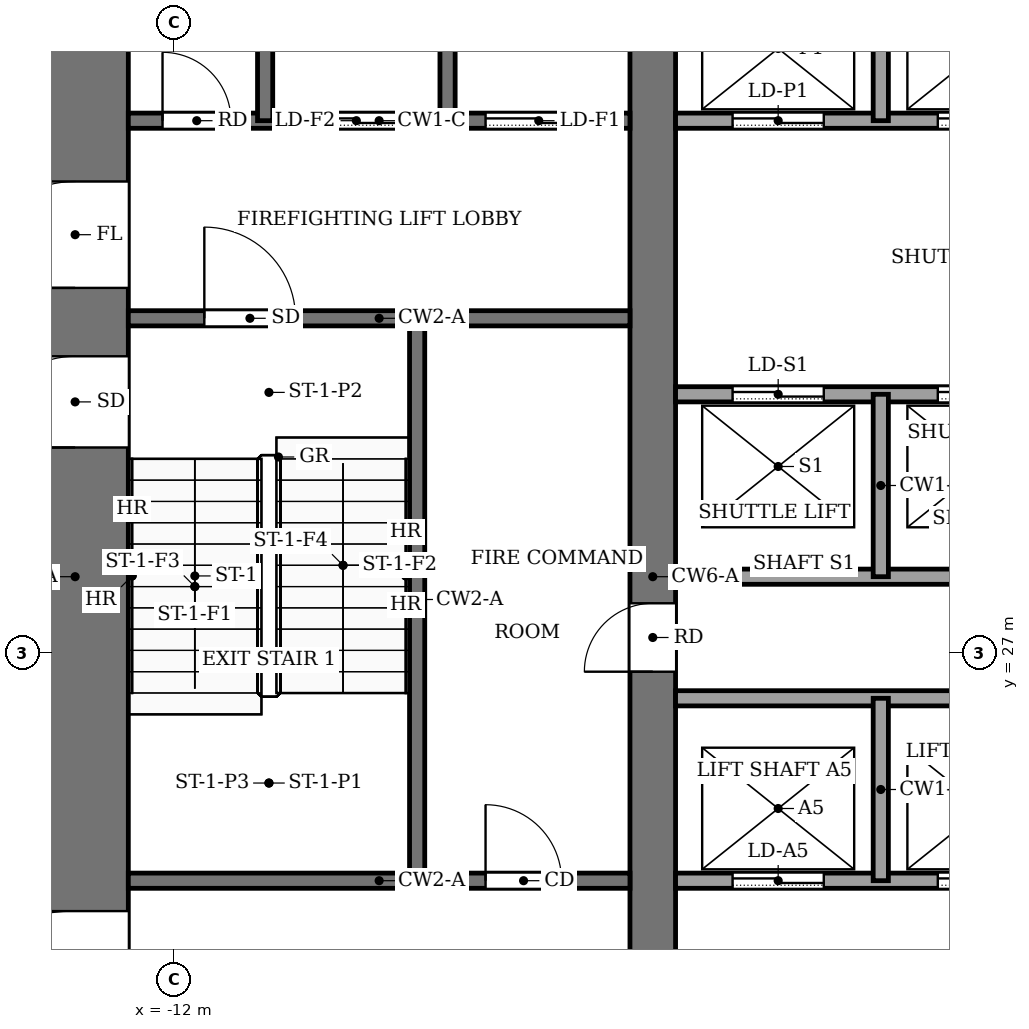
"""IFC4 building model, lengths in metres.
Left out: names, types, materials, properties, quantities, classifications, styles, units other than length and angle.
Written with IfcOpenShell. Run it as: python <this file> out.ifc"""

import sys

from ifc_helpers import new_model, si_unit, direction, frame, frame_2d, origin, place, context, subcontext, project, spatial, rectangle, extrude, element, fill, save


model = new_model("IFC4")
c1 = context("Model", 3, precision=1e-05, world=origin(), true_north=direction((0.0, 1.0)))
c2 = subcontext(c1, "Body", "Model", "MODEL_VIEW")
j1 = project(units=[si_unit("LENGTHUNIT", "METRE"), si_unit("PLANEANGLEUNIT", "RADIAN")], contexts=[c1])
p1 = place(None, origin())
s1 = spatial("IfcSite", under=j1, at=p1, CompositionType="ELEMENT")
p2 = place(p1, origin())
s2 = spatial("IfcBuilding", under=s1, at=p2, CompositionType="ELEMENT")
p3 = place(p2, origin())
s3 = spatial("IfcBuildingStorey", under=s2, at=p3, CompositionType="ELEMENT", Elevation=0.0)
p4 = place(p3, frame((-13.3, 18.4, -0.45), z_axis=(0.0, 0.0, 1.0), x_axis=(0.0, 1.0, 0.0)))
e1 = element("IfcWall", 1, at=p4, inside=s3, PredefinedType="SHEAR", context=c2, shape_type="SweptSolid", body=[
    extrude(rectangle(XDim=19.2, YDim=1.4, at=frame_2d((9.6, 0.0))), origin(), (0.0, 0.0, 1.0), 9.32),
])
p5 = place(p4, frame((2.8, 0.0, 0.45)))
e2 = element("IfcOpeningElement", 2, at=p5, cuts=e1, PredefinedType="OPENING", context=c2, shape_type="SweptSolid", body=[
    extrude(rectangle(XDim=2.4, YDim=2.4, at=frame_2d((1.2, 1.2))), frame((0.0, 0.71, 0.0), z_axis=(0.0, -1.0, 0.0), x_axis=(1.0, 0.0, 0.0)), (0.0, 0.0, 1.0), 1.42),
])
p6 = place(p4, frame((13.4, 0.0, 0.45)))
e3 = element("IfcOpeningElement", 3, at=p6, cuts=e1, PredefinedType="OPENING", context=c2, shape_type="SweptSolid", body=[
    extrude(rectangle(XDim=1.4, YDim=2.2, at=frame_2d((0.7, 1.1))), frame((0.0, 0.71, 0.0), z_axis=(0.0, -1.0, 0.0), x_axis=(1.0, 0.0, 0.0)), (0.0, 0.0, 1.0), 1.42),
])
p7 = place(p4, frame((11.3, 0.0, 0.45)))
e4 = element("IfcOpeningElement", 4, at=p7, cuts=e1, PredefinedType="OPENING", context=c2, shape_type="SweptSolid", body=[
    extrude(rectangle(XDim=1.2, YDim=2.2, at=frame_2d((0.6, 1.1))), frame((0.0, 0.71, 0.0), z_axis=(0.0, -1.0, 0.0), x_axis=(1.0, 0.0, 0.0)), (0.0, 0.0, 1.0), 1.42),
])
p8 = place(p3, frame((-5.7, 18.4, -0.45), z_axis=(0.0, 0.0, 1.0), x_axis=(0.0, 1.0, 0.0)))
e5 = element("IfcWall", 5, at=p8, inside=s3, PredefinedType="SHEAR", context=c2, shape_type="SweptSolid", body=[
    extrude(rectangle(XDim=19.2, YDim=0.6, at=frame_2d((9.6, 0.0))), origin(), (0.0, 0.0, 1.0), 9.32),
])
p9 = place(p8, frame((8.35, 0.0, 0.45)))
e6 = element("IfcOpeningElement", 6, at=p9, cuts=e5, PredefinedType="OPENING", context=c2, shape_type="SweptSolid", body=[
    extrude(rectangle(XDim=0.9, YDim=2.1, at=frame_2d((0.45, 1.05))), frame((0.0, 0.31, 0.0), z_axis=(0.0, -1.0, 0.0), x_axis=(1.0, 0.0, 0.0)), (0.0, 0.0, 1.0), 0.62),
])
p10 = place(p3, frame((-12.6, 24.0, 0.0), z_axis=(0.0, 0.0, 1.0), x_axis=(1.0, 0.0, 0.0)))
e7 = element("IfcWall", 7, at=p10, inside=s3, PredefinedType="PARTITIONING", context=c2, shape_type="SweptSolid", body=[
    extrude(rectangle(XDim=6.6, YDim=0.2, at=frame_2d((3.3, 0.0))), origin(), (0.0, 0.0, 1.0), 8.87),
])
p11 = place(p10, frame((4.7, 0.0, 0.0)))
e8 = element("IfcOpeningElement", 8, at=p11, cuts=e7, PredefinedType="OPENING", context=c2, shape_type="SweptSolid", body=[
    extrude(rectangle(XDim=1.0, YDim=2.1, at=frame_2d((0.5, 1.05))), frame((0.0, 0.11, 0.0), z_axis=(0.0, -1.0, 0.0), x_axis=(1.0, 0.0, 0.0)), (0.0, 0.0, 1.0), 0.22),
])
p12 = place(p3, frame((-5.4, 24.0, 0.0), z_axis=(0.0, 0.0, 1.0), x_axis=(1.0, 0.0, 0.0)))
e9 = element("IfcWall", 9, at=p12, inside=s3, PredefinedType="PARTITIONING", context=c2, shape_type="SweptSolid", body=[
    extrude(rectangle(XDim=10.8, YDim=0.2, at=frame_2d((5.4, 0.0))), origin(), (0.0, 0.0, 1.0), 8.87),
])
p13 = place(p12, frame((0.75, 0.0, 0.0)))
e10 = element("IfcOpeningElement", 10, at=p13, cuts=e9, PredefinedType="OPENING", context=c2, shape_type="SweptSolid", body=[
    extrude(rectangle(XDim=1.2, YDim=2.2, at=frame_2d((0.6, 1.1))), frame((0.0, 0.11, 0.0), z_axis=(0.0, -1.0, 0.0), x_axis=(1.0, 0.0, 0.0)), (0.0, 0.0, 1.0), 0.22),
])
p14 = place(p12, frame((3.45, 0.0, 0.0)))
e11 = element("IfcOpeningElement", 11, at=p14, cuts=e9, PredefinedType="OPENING", context=c2, shape_type="SweptSolid", body=[
    extrude(rectangle(XDim=1.2, YDim=2.2, at=frame_2d((0.6, 1.1))), frame((0.0, 0.11, 0.0), z_axis=(0.0, -1.0, 0.0), x_axis=(1.0, 0.0, 0.0)), (0.0, 0.0, 1.0), 0.22),
])
p15 = place(p12, frame((6.15, 0.0, 0.0)))
e12 = element("IfcOpeningElement", 12, at=p15, cuts=e9, PredefinedType="OPENING", context=c2, shape_type="SweptSolid", body=[
    extrude(rectangle(XDim=1.2, YDim=2.2, at=frame_2d((0.6, 1.1))), frame((0.0, 0.11, 0.0), z_axis=(0.0, -1.0, 0.0), x_axis=(1.0, 0.0, 0.0)), (0.0, 0.0, 1.0), 0.22),
])
p16 = place(p12, frame((8.85, 0.0, 0.0)))
e13 = element("IfcOpeningElement", 13, at=p16, cuts=e9, PredefinedType="OPENING", context=c2, shape_type="SweptSolid", body=[
    extrude(rectangle(XDim=1.2, YDim=2.2, at=frame_2d((0.6, 1.1))), frame((0.0, 0.11, 0.0), z_axis=(0.0, -1.0, 0.0), x_axis=(1.0, 0.0, 0.0)), (0.0, 0.0, 1.0), 0.22),
])
for number, where, z_axis, x_axis in (
    (14, (-5.4, 26.4, 0.0), (0.0, 0.0, 1.0), (1.0, 0.0, 0.0)),
    (15, (-5.4, 28.0, 0.0), (0.0, 0.0, 1.0), (1.0, 0.0, 0.0)),
):
    element("IfcWall", number, at=place(p3, frame(where, z_axis=z_axis, x_axis=x_axis)), inside=s3, PredefinedType="PARTITIONING", context=c2, shape_type="SweptSolid", body=[
        extrude(rectangle(XDim=10.8, YDim=0.2, at=frame_2d((5.4, 0.0))), origin(), (0.0, 0.0, 1.0), 8.87),
    ])
p17 = place(p3, frame((-5.4, 30.4, 0.0), z_axis=(0.0, 0.0, 1.0), x_axis=(1.0, 0.0, 0.0)))
e16 = element("IfcWall", 16, at=p17, inside=s3, PredefinedType="PARTITIONING", context=c2, shape_type="SweptSolid", body=[
    extrude(rectangle(XDim=10.8, YDim=0.2, at=frame_2d((5.4, 0.0))), origin(), (0.0, 0.0, 1.0), 8.87),
])
p18 = place(p17, frame((0.75, 0.0, 0.0)))
e17 = element("IfcOpeningElement", 17, at=p18, cuts=e16, PredefinedType="OPENING", context=c2, shape_type="SweptSolid", body=[
    extrude(rectangle(XDim=1.2, YDim=2.2, at=frame_2d((0.6, 1.1))), frame((0.0, 0.11, 0.0), z_axis=(0.0, -1.0, 0.0), x_axis=(1.0, 0.0, 0.0)), (0.0, 0.0, 1.0), 0.22),
])
p19 = place(p17, frame((3.45, 0.0, 0.0)))
e18 = element("IfcOpeningElement", 18, at=p19, cuts=e16, PredefinedType="OPENING", context=c2, shape_type="SweptSolid", body=[
    extrude(rectangle(XDim=1.2, YDim=2.2, at=frame_2d((0.6, 1.1))), frame((0.0, 0.11, 0.0), z_axis=(0.0, -1.0, 0.0), x_axis=(1.0, 0.0, 0.0)), (0.0, 0.0, 1.0), 0.22),
])
p20 = place(p17, frame((6.15, 0.0, 0.0)))
e19 = element("IfcOpeningElement", 19, at=p20, cuts=e16, PredefinedType="OPENING", context=c2, shape_type="SweptSolid", body=[
    extrude(rectangle(XDim=1.2, YDim=2.2, at=frame_2d((0.6, 1.1))), frame((0.0, 0.11, 0.0), z_axis=(0.0, -1.0, 0.0), x_axis=(1.0, 0.0, 0.0)), (0.0, 0.0, 1.0), 0.22),
])
p21 = place(p17, frame((8.85, 0.0, 0.0)))
e20 = element("IfcOpeningElement", 20, at=p21, cuts=e16, PredefinedType="OPENING", context=c2, shape_type="SweptSolid", body=[
    extrude(rectangle(XDim=1.2, YDim=2.2, at=frame_2d((0.6, 1.1))), frame((0.0, 0.11, 0.0), z_axis=(0.0, -1.0, 0.0), x_axis=(1.0, 0.0, 0.0)), (0.0, 0.0, 1.0), 0.22),
])
p22 = place(p3, frame((-12.6, 31.4, 0.0), z_axis=(0.0, 0.0, 1.0), x_axis=(1.0, 0.0, 0.0)))
e21 = element("IfcWall", 21, at=p22, inside=s3, PredefinedType="PARTITIONING", context=c2, shape_type="SweptSolid", body=[
    extrude(rectangle(XDim=6.6, YDim=0.2, at=frame_2d((3.3, 0.0))), origin(), (0.0, 0.0, 1.0), 8.87),
])
p23 = place(p22, frame((1.0, 0.0, 0.0)))
e22 = element("IfcOpeningElement", 22, at=p23, cuts=e21, PredefinedType="OPENING", context=c2, shape_type="SweptSolid", body=[
    extrude(rectangle(XDim=1.2, YDim=2.2, at=frame_2d((0.6, 1.1))), frame((0.0, 0.11, 0.0), z_axis=(0.0, -1.0, 0.0), x_axis=(1.0, 0.0, 0.0)), (0.0, 0.0, 1.0), 0.22),
])
p24 = place(p3, frame((-12.6, 34.0, 0.0), z_axis=(0.0, 0.0, 1.0), x_axis=(1.0, 0.0, 0.0)))
e23 = element("IfcWall", 23, at=p24, inside=s3, PredefinedType="PARTITIONING", context=c2, shape_type="SweptSolid", body=[
    extrude(rectangle(XDim=6.6, YDim=0.2, at=frame_2d((3.3, 0.0))), origin(), (0.0, 0.0, 1.0), 8.87),
])
p25 = place(p24, frame((4.7, 0.0, 0.0)))
e24 = element("IfcOpeningElement", 24, at=p25, cuts=e23, PredefinedType="OPENING", context=c2, shape_type="SweptSolid", body=[
    extrude(rectangle(XDim=1.4, YDim=2.2, at=frame_2d((0.7, 1.1))), frame((0.0, 0.11, 0.0), z_axis=(0.0, -1.0, 0.0), x_axis=(1.0, 0.0, 0.0)), (0.0, 0.0, 1.0), 0.22),
])
p26 = place(p24, frame((2.3, 0.0, 0.0)))
e25 = element("IfcOpeningElement", 25, at=p26, cuts=e23, PredefinedType="OPENING", context=c2, shape_type="SweptSolid", body=[
    extrude(rectangle(XDim=1.4, YDim=2.2, at=frame_2d((0.7, 1.1))), frame((0.0, 0.11, 0.0), z_axis=(0.0, -1.0, 0.0), x_axis=(1.0, 0.0, 0.0)), (0.0, 0.0, 1.0), 0.22),
])
p27 = place(p24, frame((0.45, 0.0, 0.0)))
e26 = element("IfcOpeningElement", 26, at=p27, cuts=e23, PredefinedType="OPENING", context=c2, shape_type="SweptSolid", body=[
    extrude(rectangle(XDim=0.9, YDim=2.1, at=frame_2d((0.45, 1.05))), frame((0.0, 0.11, 0.0), z_axis=(0.0, -1.0, 0.0), x_axis=(1.0, 0.0, 0.0)), (0.0, 0.0, 1.0), 0.22),
])
p28 = place(p3, frame((-5.4, 34.0, 0.0), z_axis=(0.0, 0.0, 1.0), x_axis=(1.0, 0.0, 0.0)))
e27 = element("IfcWall", 27, at=p28, inside=s3, PredefinedType="PARTITIONING", context=c2, shape_type="SweptSolid", body=[
    extrude(rectangle(XDim=10.8, YDim=0.2, at=frame_2d((5.4, 0.0))), origin(), (0.0, 0.0, 1.0), 8.87),
])
p29 = place(p28, frame((0.75, 0.0, 0.0)))
e28 = element("IfcOpeningElement", 28, at=p29, cuts=e27, PredefinedType="OPENING", context=c2, shape_type="SweptSolid", body=[
    extrude(rectangle(XDim=1.2, YDim=2.2, at=frame_2d((0.6, 1.1))), frame((0.0, 0.11, 0.0), z_axis=(0.0, -1.0, 0.0), x_axis=(1.0, 0.0, 0.0)), (0.0, 0.0, 1.0), 0.22),
])
p30 = place(p28, frame((3.45, 0.0, 0.0)))
e29 = element("IfcOpeningElement", 29, at=p30, cuts=e27, PredefinedType="OPENING", context=c2, shape_type="SweptSolid", body=[
    extrude(rectangle(XDim=1.2, YDim=2.2, at=frame_2d((0.6, 1.1))), frame((0.0, 0.11, 0.0), z_axis=(0.0, -1.0, 0.0), x_axis=(1.0, 0.0, 0.0)), (0.0, 0.0, 1.0), 0.22),
])
p31 = place(p28, frame((6.15, 0.0, 0.0)))
e30 = element("IfcOpeningElement", 30, at=p31, cuts=e27, PredefinedType="OPENING", context=c2, shape_type="SweptSolid", body=[
    extrude(rectangle(XDim=1.2, YDim=2.2, at=frame_2d((0.6, 1.1))), frame((0.0, 0.11, 0.0), z_axis=(0.0, -1.0, 0.0), x_axis=(1.0, 0.0, 0.0)), (0.0, 0.0, 1.0), 0.22),
])
p32 = place(p28, frame((8.95, 0.0, 0.0)))
e31 = element("IfcOpeningElement", 31, at=p32, cuts=e27, PredefinedType="OPENING", context=c2, shape_type="SweptSolid", body=[
    extrude(rectangle(XDim=1.0, YDim=2.1, at=frame_2d((0.5, 1.05))), frame((0.0, 0.11, 0.0), z_axis=(0.0, -1.0, 0.0), x_axis=(1.0, 0.0, 0.0)), (0.0, 0.0, 1.0), 0.22),
])
p33 = place(p3, frame((-10.8, 34.0, 0.0), z_axis=(0.0, 0.0, 1.0), x_axis=(0.0, 1.0, 0.0)))
e32 = element("IfcWall", 32, at=p33, inside=s3, PredefinedType="PARTITIONING", context=c2, shape_type="SweptSolid", body=[
    extrude(rectangle(XDim=3.6, YDim=0.2, at=frame_2d((1.8, 0.0))), origin(), (0.0, 0.0, 1.0), 8.87),
])
p34 = place(p3, frame((-8.8, 24.0, 0.0), z_axis=(0.0, 0.0, 1.0), x_axis=(0.0, 1.0, 0.0)))
e33 = element("IfcWall", 33, at=p34, inside=s3, PredefinedType="PARTITIONING", context=c2, shape_type="SweptSolid", body=[
    extrude(rectangle(XDim=7.4, YDim=0.2, at=frame_2d((3.7, 0.0))), origin(), (0.0, 0.0, 1.0), 8.87),
])
p35 = place(p3, frame((-8.4, 34.0, 0.0), z_axis=(0.0, 0.0, 1.0), x_axis=(0.0, 1.0, 0.0)))
e34 = element("IfcWall", 34, at=p35, inside=s3, PredefinedType="PARTITIONING", context=c2, shape_type="SweptSolid", body=[
    extrude(rectangle(XDim=3.6, YDim=0.2, at=frame_2d((1.8, 0.0))), origin(), (0.0, 0.0, 1.0), 8.87),
])
for number, where, z_axis, x_axis in (
    (35, (-2.7, 24.0, 0.0), (0.0, 0.0, 1.0), (0.0, 1.0, 0.0)),
    (36, (-2.7, 28.0, 0.0), (0.0, 0.0, 1.0), (0.0, 1.0, 0.0)),
):
    element("IfcWall", number, at=place(p3, frame(where, z_axis=z_axis, x_axis=x_axis)), inside=s3, PredefinedType="PARTITIONING", context=c2, shape_type="SweptSolid", body=[
        extrude(rectangle(XDim=2.4, YDim=0.2, at=frame_2d((1.2, 0.0))), origin(), (0.0, 0.0, 1.0), 8.87),
    ])
p36 = place(p3, frame((-2.7, 34.0, 0.0), z_axis=(0.0, 0.0, 1.0), x_axis=(0.0, 1.0, 0.0)))
e37 = element("IfcWall", 37, at=p36, inside=s3, PredefinedType="PARTITIONING", context=c2, shape_type="SweptSolid", body=[
    extrude(rectangle(XDim=3.6, YDim=0.2, at=frame_2d((1.8, 0.0))), origin(), (0.0, 0.0, 1.0), 8.87),
])
p37 = place(p13, origin())
e38 = element("IfcDoor", 38, at=p37, inside=s3, OperationType="SLIDING_TO_LEFT", PredefinedType="DOOR", context=c2, shape_type="SweptSolid", body=[
    extrude(rectangle(XDim=1.2, YDim=2.2, at=frame_2d((0.6, 1.1))), frame((0.0, 0.025, 0.0), z_axis=(0.0, -1.0, 0.0), x_axis=(1.0, 0.0, 0.0)), (0.0, 0.0, 1.0), 0.05),
])
fill(e10, e38)
p38 = place(p14, origin())
e39 = element("IfcDoor", 39, at=p38, inside=s3, OperationType="SLIDING_TO_LEFT", PredefinedType="DOOR", context=c2, shape_type="SweptSolid", body=[
    extrude(rectangle(XDim=1.2, YDim=2.2, at=frame_2d((0.6, 1.1))), frame((0.0, 0.025, 0.0), z_axis=(0.0, -1.0, 0.0), x_axis=(1.0, 0.0, 0.0)), (0.0, 0.0, 1.0), 0.05),
])
fill(e11, e39)
p39 = place(p18, origin())
e40 = element("IfcDoor", 40, at=p39, inside=s3, OperationType="SLIDING_TO_LEFT", PredefinedType="DOOR", context=c2, shape_type="SweptSolid", body=[
    extrude(rectangle(XDim=1.2, YDim=2.2, at=frame_2d((0.6, 1.1))), frame((0.0, 0.025, 0.0), z_axis=(0.0, -1.0, 0.0), x_axis=(1.0, 0.0, 0.0)), (0.0, 0.0, 1.0), 0.05),
])
fill(e17, e40)
p40 = place(p19, origin())
e41 = element("IfcDoor", 41, at=p40, inside=s3, OperationType="SLIDING_TO_LEFT", PredefinedType="DOOR", context=c2, shape_type="SweptSolid", body=[
    extrude(rectangle(XDim=1.2, YDim=2.2, at=frame_2d((0.6, 1.1))), frame((0.0, 0.025, 0.0), z_axis=(0.0, -1.0, 0.0), x_axis=(1.0, 0.0, 0.0)), (0.0, 0.0, 1.0), 0.05),
])
fill(e18, e41)
p41 = place(p29, origin())
e42 = element("IfcDoor", 42, at=p41, inside=s3, OperationType="SLIDING_TO_LEFT", PredefinedType="DOOR", context=c2, shape_type="SweptSolid", body=[
    extrude(rectangle(XDim=1.2, YDim=2.2, at=frame_2d((0.6, 1.1))), frame((0.0, 0.025, 0.0), z_axis=(0.0, -1.0, 0.0), x_axis=(1.0, 0.0, 0.0)), (0.0, 0.0, 1.0), 0.05),
])
fill(e28, e42)
p42 = place(p30, origin())
e43 = element("IfcDoor", 43, at=p42, inside=s3, OperationType="SLIDING_TO_LEFT", PredefinedType="DOOR", context=c2, shape_type="SweptSolid", body=[
    extrude(rectangle(XDim=1.2, YDim=2.2, at=frame_2d((0.6, 1.1))), frame((0.0, 0.025, 0.0), z_axis=(0.0, -1.0, 0.0), x_axis=(1.0, 0.0, 0.0)), (0.0, 0.0, 1.0), 0.05),
])
fill(e29, e43)
p43 = place(p25, origin())
e44 = element("IfcDoor", 44, at=p43, inside=s3, OperationType="SLIDING_TO_LEFT", PredefinedType="DOOR", context=c2, shape_type="SweptSolid", body=[
    extrude(rectangle(XDim=1.4, YDim=2.2, at=frame_2d((0.7, 1.1))), frame((0.0, 0.025, 0.0), z_axis=(0.0, -1.0, 0.0), x_axis=(1.0, 0.0, 0.0)), (0.0, 0.0, 1.0), 0.05),
])
fill(e24, e44)
p44 = place(p26, origin())
e45 = element("IfcDoor", 45, at=p44, inside=s3, OperationType="SLIDING_TO_LEFT", PredefinedType="DOOR", context=c2, shape_type="SweptSolid", body=[
    extrude(rectangle(XDim=1.4, YDim=2.2, at=frame_2d((0.7, 1.1))), frame((0.0, 0.025, 0.0), z_axis=(0.0, -1.0, 0.0), x_axis=(1.0, 0.0, 0.0)), (0.0, 0.0, 1.0), 0.05),
])
fill(e25, e45)
p45 = place(p27, origin())
e46 = element("IfcDoor", 46, at=p45, inside=s3, OperationType="SINGLE_SWING_RIGHT", PredefinedType="DOOR", context=c2, shape_type="SweptSolid", body=[
    extrude(rectangle(XDim=0.9, YDim=2.1, at=frame_2d((0.45, 1.05))), frame((0.0, 0.025, 0.0), z_axis=(0.0, -1.0, 0.0), x_axis=(1.0, 0.0, 0.0)), (0.0, 0.0, 1.0), 0.05),
])
fill(e26, e46)
p46 = place(p11, origin())
e47 = element("IfcDoor", 47, at=p46, inside=s3, OperationType="SINGLE_SWING_RIGHT", PredefinedType="DOOR", context=c2, shape_type="SweptSolid", body=[
    extrude(rectangle(XDim=1.0, YDim=2.1, at=frame_2d((0.5, 1.05))), frame((0.0, 0.025, 0.0), z_axis=(0.0, -1.0, 0.0), x_axis=(1.0, 0.0, 0.0)), (0.0, 0.0, 1.0), 0.05),
])
fill(e8, e47)
p47 = place(p9, origin())
e48 = element("IfcDoor", 48, at=p47, inside=s3, OperationType="SINGLE_SWING_RIGHT", PredefinedType="DOOR", context=c2, shape_type="SweptSolid", body=[
    extrude(rectangle(XDim=0.9, YDim=2.1, at=frame_2d((0.45, 1.05))), frame((0.0, 0.025, 0.0), z_axis=(0.0, -1.0, 0.0), x_axis=(1.0, 0.0, 0.0)), (0.0, 0.0, 1.0), 0.05),
])
fill(e6, e48)
p48 = place(p23, origin())
e49 = element("IfcDoor", 49, at=p48, inside=s3, OperationType="SINGLE_SWING_RIGHT", PredefinedType="DOOR", context=c2, shape_type="SweptSolid", body=[
    extrude(rectangle(XDim=1.2, YDim=2.2, at=frame_2d((0.6, 1.1))), frame((0.0, 0.025, 0.0), z_axis=(0.0, -1.0, 0.0), x_axis=(1.0, 0.0, 0.0)), (0.0, 0.0, 1.0), 0.05),
])
fill(e22, e49)
p49 = place(p5, origin())
e50 = element("IfcDoor", 50, at=p49, inside=s3, OperationType="DOUBLE_DOOR_SINGLE_SWING", PredefinedType="DOOR", context=c2, shape_type="SweptSolid", body=[
    extrude(rectangle(XDim=2.4, YDim=2.4, at=frame_2d((1.2, 1.2))), frame((0.0, 0.025, 0.0), z_axis=(0.0, -1.0, 0.0), x_axis=(1.0, 0.0, 0.0)), (0.0, 0.0, 1.0), 0.05),
])
fill(e2, e50)
p50 = place(p6, origin())
e51 = element("IfcDoor", 51, at=p50, inside=s3, OperationType="SINGLE_SWING_RIGHT", PredefinedType="DOOR", context=c2, shape_type="SweptSolid", body=[
    extrude(rectangle(XDim=1.4, YDim=2.2, at=frame_2d((0.7, 1.1))), frame((0.0, 0.025, 0.0), z_axis=(0.0, -1.0, 0.0), x_axis=(1.0, 0.0, 0.0)), (0.0, 0.0, 1.0), 0.05),
])
fill(e3, e51)
p51 = place(p7, origin())
e52 = element("IfcDoor", 52, at=p51, inside=s3, OperationType="SINGLE_SWING_LEFT", PredefinedType="DOOR", context=c2, shape_type="SweptSolid", body=[
    extrude(rectangle(XDim=1.2, YDim=2.2, at=frame_2d((0.6, 1.1))), frame((0.0, -0.65, 0.0), z_axis=(0.0, -1.0, 0.0), x_axis=(1.0, 0.0, 0.0)), (0.0, 0.0, 1.0), 0.05),
])
fill(e4, e52)
save(model, sys.argv[1])
